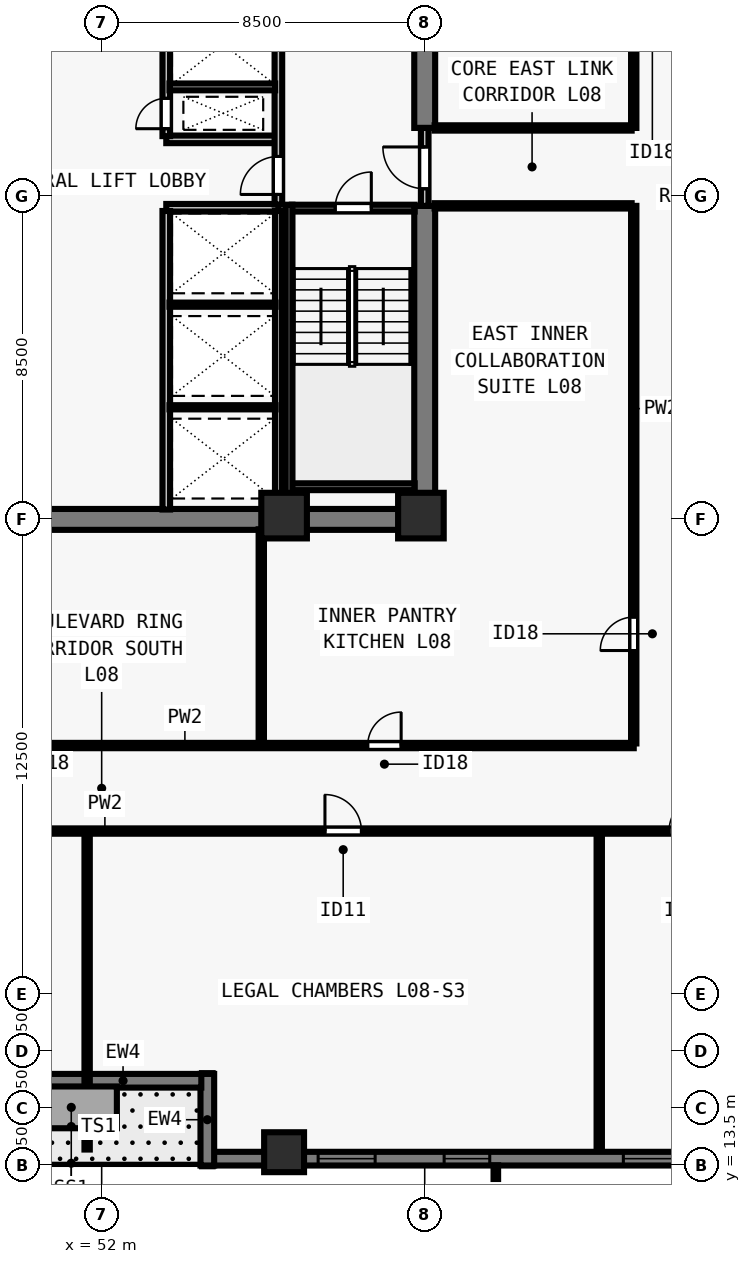
"""IFC4 building model, lengths in metres.
Left out: names, types, materials, properties, quantities, classifications, styles, units other than length and angle.
Written with IfcOpenShell. Run it as: python <this file> out.ifc"""

import sys

from ifc_helpers import new_model, si_unit, direction, frame, frame_2d, origin, origin_2d, place, context, subcontext, project, spatial, rectangle, extrude, element, fill, save


model = new_model("IFC4")
c1 = context("Model", 3, precision=1e-05, world=origin(), true_north=direction((0.0, 1.0)))
c2 = subcontext(c1, "Body", "Model", "MODEL_VIEW")
j1 = project(units=[si_unit("LENGTHUNIT", "METRE"), si_unit("PLANEANGLEUNIT", "RADIAN")], contexts=[c1])
p1 = place(None, origin())
s1 = spatial("IfcSite", under=j1, at=p1, CompositionType="ELEMENT")
p2 = place(p1, origin())
s2 = spatial("IfcBuilding", under=s1, at=p2, CompositionType="ELEMENT")
p3 = place(p2, frame((0.0, 0.0, 34.0)))
s3 = spatial("IfcBuildingStorey", under=s2, at=p3, CompositionType="ELEMENT", Elevation=34.0)
for number, where, z_axis, x_axis in (
    (1, (56.8, 30.6, 0.0), (0.0, 0.0, 1.0), (1.0, 0.0, 0.0)),
    (2, (60.4, 30.6, 0.0), (0.0, 0.0, 1.0), (1.0, 0.0, 0.0)),
):
    element("IfcColumn", number, at=place(p3, frame(where, z_axis=z_axis, x_axis=x_axis)), inside=s3, PredefinedType="COLUMN", context=c2, shape_type="SweptSolid", body=[
        extrude(rectangle(XDim=1.2, YDim=1.2, at=origin_2d()), origin(), (0.0, 0.0, 1.0), 3.5),
    ])
p4 = place(p3, frame((56.8, 13.85, 0.0), z_axis=(0.0, 0.0, 1.0), x_axis=(1.0, 0.0, 0.0)))
e3 = element("IfcColumn", 3, at=p4, inside=s3, PredefinedType="COLUMN", context=c2, shape_type="SweptSolid", body=[
    extrude(rectangle(XDim=1.05, YDim=1.05, at=origin_2d()), origin(), (0.0, 0.0, 1.0), 3.5),
])
p5 = place(p3, frame((74.5, 13.68, 0.0), z_axis=(0.0, 0.0, 1.0), x_axis=(-1.0, 0.0, 0.0)))
e4 = element("IfcWall", 4, at=p5, inside=s3, PredefinedType="SOLIDWALL", context=c2, shape_type="SweptSolid", body=[
    extrude(rectangle(XDim=19.562, YDim=0.36, at=frame_2d((9.781, 0.0))), origin(), (0.0, 0.0, 1.0), 3.28),
])
p6 = place(p5, frame((5.058, 0.0, 0.8)))
e5 = element("IfcOpeningElement", 5, at=p6, cuts=e4, PredefinedType="OPENING", context=c2, shape_type="SweptSolid", body=[
    extrude(rectangle(XDim=1.2, YDim=1.544, at=frame_2d((0.6, 0.772))), frame((0.0, 0.19, 0.0), z_axis=(0.0, -1.0, 0.0), x_axis=(1.0, 0.0, 0.0)), (0.0, 0.0, 1.0), 0.38),
])
p7 = place(p5, frame((7.273, 0.0, 0.8)))
e6 = element("IfcOpeningElement", 6, at=p7, cuts=e4, PredefinedType="OPENING", context=c2, shape_type="SweptSolid", body=[
    extrude(rectangle(XDim=1.5, YDim=1.544, at=frame_2d((0.75, 0.772))), frame((0.0, 0.19, 0.0), z_axis=(0.0, -1.0, 0.0), x_axis=(1.0, 0.0, 0.0)), (0.0, 0.0, 1.0), 0.38),
])
p8 = place(p5, frame((12.289, 0.0, 0.8)))
e7 = element("IfcOpeningElement", 7, at=p8, cuts=e4, PredefinedType="OPENING", context=c2, shape_type="SweptSolid", body=[
    extrude(rectangle(XDim=1.2, YDim=1.544, at=frame_2d((0.6, 0.772))), frame((0.0, 0.19, 0.0), z_axis=(0.0, -1.0, 0.0), x_axis=(1.0, 0.0, 0.0)), (0.0, 0.0, 1.0), 0.38),
])
p9 = place(p5, frame((15.304, 0.0, 0.8)))
e8 = element("IfcOpeningElement", 8, at=p9, cuts=e4, PredefinedType="OPENING", context=c2, shape_type="SweptSolid", body=[
    extrude(rectangle(XDim=1.5, YDim=1.544, at=frame_2d((0.75, 0.772))), frame((0.0, 0.19, 0.0), z_axis=(0.0, -1.0, 0.0), x_axis=(1.0, 0.0, 0.0)), (0.0, 0.0, 1.0), 0.38),
])
p10 = place(p3, frame((54.78, 13.5, 0.0), z_axis=(0.0, 0.0, 1.0), x_axis=(0.0, 1.0, 0.0)))
e9 = element("IfcWall", 9, at=p10, inside=s3, PredefinedType="SOLIDWALL", context=c2, shape_type="SweptSolid", body=[
    extrude(rectangle(XDim=2.41, YDim=0.36, at=frame_2d((1.205, 0.0))), origin(), (0.0, 0.0, 1.0), 3.28),
])
p11 = place(p3, frame((54.622, 15.73, 0.0), z_axis=(0.0, 0.0, 1.0), x_axis=(-1.0, 0.0, 0.0)))
e10 = element("IfcWall", 10, at=p11, inside=s3, PredefinedType="SOLIDWALL", context=c2, shape_type="SweptSolid", body=[
    extrude(rectangle(XDim=7.182, YDim=0.36, at=frame_2d((3.591, 0.0))), origin(), (0.0, 0.0, 1.0), 3.28),
])
p12 = place(p11, frame((4.268, 0.0, 0.0)))
e11 = element("IfcOpeningElement", 11, at=p12, cuts=e10, PredefinedType="OPENING", context=c2, shape_type="SweptSolid", body=[
    extrude(rectangle(XDim=1.0, YDim=2.15, at=frame_2d((0.5, 1.075))), frame((0.0, 0.19, 0.0), z_axis=(0.0, -1.0, 0.0), x_axis=(1.0, 0.0, 0.0)), (0.0, 0.0, 1.0), 0.38),
])
p13 = place(p3, frame((43.225, 30.5, 0.0), z_axis=(0.0, 0.0, 1.0), x_axis=(1.0, 0.0, 0.0)))
e12 = element("IfcWall", 12, at=p13, inside=s3, PredefinedType="SHEAR", context=c2, shape_type="SweptSolid", body=[
    extrude(rectangle(XDim=17.55, YDim=0.55, at=frame_2d((8.775, 0.0))), origin(), (0.0, 0.0, 1.0), 3.28),
])
p14 = place(p3, frame((60.5, 30.765, 0.0), z_axis=(0.0, 0.0, 1.0), x_axis=(0.0, 1.0, 0.0)))
e13 = element("IfcWall", 13, at=p14, inside=s3, PredefinedType="SHEAR", context=c2, shape_type="SweptSolid", body=[
    extrude(rectangle(XDim=7.985, YDim=0.55, at=frame_2d((3.993, 0.0))), origin(), (0.0, 0.0, 1.0), 3.28),
])
p15 = place(p3, frame((60.5, 40.8, 0.0), z_axis=(0.0, 0.0, 1.0), x_axis=(0.0, 1.0, 0.0)))
e14 = element("IfcWall", 14, at=p15, inside=s3, PredefinedType="SHEAR", context=c2, shape_type="SweptSolid", body=[
    extrude(rectangle(XDim=6.435, YDim=0.55, at=frame_2d((3.218, 0.0))), origin(), (0.0, 0.0, 1.0), 3.28),
])
for number, where, z_axis, x_axis in (
    (15, (53.7, 38.7, 0.0), (0.0, 0.0, 1.0), (1.0, 0.0, 0.0)),
    (16, (53.7, 40.5, 0.0), (0.0, 0.0, 1.0), (1.0, 0.0, 0.0)),
):
    element("IfcWall", number, at=place(p3, frame(where, z_axis=z_axis, x_axis=x_axis)), inside=s3, PredefinedType="SOLIDWALL", context=c2, shape_type="SweptSolid", body=[
        extrude(rectangle(XDim=2.95, YDim=0.2, at=frame_2d((1.475, 0.0))), origin(), (0.0, 0.0, 1.0), 3.28),
    ])
p16 = place(p3, frame((53.7, 30.76, 0.0), z_axis=(0.0, 0.0, 1.0), x_axis=(0.0, 1.0, 0.0)))
e17 = element("IfcWall", 17, at=p16, inside=s3, PredefinedType="SOLIDWALL", context=c2, shape_type="SweptSolid", body=[
    extrude(rectangle(XDim=7.855, YDim=0.2, at=frame_2d((3.927, 0.0))), origin(), (0.0, 0.0, 1.0), 3.28),
])
p17 = place(p3, frame((53.7, 40.585, 0.0), z_axis=(0.0, 0.0, 1.0), x_axis=(0.0, 1.0, 0.0)))
e18 = element("IfcWall", 18, at=p17, inside=s3, PredefinedType="SOLIDWALL", context=c2, shape_type="SweptSolid", body=[
    extrude(rectangle(XDim=6.655, YDim=0.2, at=frame_2d((3.328, 0.0))), origin(), (0.0, 0.0, 1.0), 3.28),
])
p18 = place(p17, frame((0.195, 0.0, 0.0)))
e19 = element("IfcOpeningElement", 19, at=p18, cuts=e18, PredefinedType="OPENING", context=c2, shape_type="SweptSolid", body=[
    extrude(rectangle(XDim=0.8, YDim=2.08, at=frame_2d((0.4, 1.04))), frame((0.0, 0.11, 0.0), z_axis=(0.0, -1.0, 0.0), x_axis=(1.0, 0.0, 0.0)), (0.0, 0.0, 1.0), 0.22),
])
p19 = place(p17, frame((3.735, 0.0, 0.0)))
e20 = element("IfcOpeningElement", 20, at=p19, cuts=e18, PredefinedType="OPENING", context=c2, shape_type="SweptSolid", body=[
    extrude(rectangle(XDim=0.9, YDim=2.12, at=frame_2d((0.45, 1.06))), frame((0.0, 0.11, 0.0), z_axis=(0.0, -1.0, 0.0), x_axis=(1.0, 0.0, 0.0)), (0.0, 0.0, 1.0), 0.22),
])
p20 = place(p17, frame((5.395, 0.0, 0.0)))
e21 = element("IfcOpeningElement", 21, at=p20, cuts=e18, PredefinedType="OPENING", context=c2, shape_type="SweptSolid", body=[
    extrude(rectangle(XDim=0.8, YDim=2.1, at=frame_2d((0.4, 1.05))), frame((0.0, 0.11, 0.0), z_axis=(0.0, -1.0, 0.0), x_axis=(1.0, 0.0, 0.0)), (0.0, 0.0, 1.0), 0.22),
])
p21 = place(p3, frame((60.5, 38.75, 0.0), z_axis=(0.0, 0.0, 1.0), x_axis=(0.0, 1.0, 0.0)))
e22 = element("IfcWall", 22, at=p21, inside=s3, PredefinedType="SOLIDWALL", context=c2, shape_type="SweptSolid", body=[
    extrude(rectangle(XDim=2.05, YDim=0.2, at=frame_2d((1.025, 0.0))), origin(), (0.0, 0.0, 1.0), 3.28),
])
p22 = place(p21, frame((0.45, 0.0, 0.0)))
e23 = element("IfcOpeningElement", 23, at=p22, cuts=e22, PredefinedType="OPENING", context=c2, shape_type="SweptSolid", body=[
    extrude(rectangle(XDim=1.1, YDim=2.15, at=frame_2d((0.55, 1.075))), frame((0.0, 0.11, 0.0), z_axis=(0.0, -1.0, 0.0), x_axis=(1.0, 0.0, 0.0)), (0.0, 0.0, 1.0), 0.22),
])
p23 = place(p3, frame((56.65, 38.785, 0.0), z_axis=(0.0, 0.0, 1.0), x_axis=(0.0, 1.0, 0.0)))
e24 = element("IfcWall", 24, at=p23, inside=s3, PredefinedType="SOLIDWALL", context=c2, shape_type="SweptSolid", body=[
    extrude(rectangle(XDim=4.865, YDim=0.2, at=frame_2d((2.433, 0.0))), origin(), (0.0, 0.0, 1.0), 3.28),
])
p24 = place(p23, frame((0.265, 0.0, 0.0)))
e25 = element("IfcOpeningElement", 25, at=p24, cuts=e24, PredefinedType="OPENING", context=c2, shape_type="SweptSolid", body=[
    extrude(rectangle(XDim=1.0, YDim=2.15, at=frame_2d((0.5, 1.075))), frame((0.0, 0.11, 0.0), z_axis=(0.0, -1.0, 0.0), x_axis=(1.0, 0.0, 0.0)), (0.0, 0.0, 1.0), 0.22),
])
p25 = place(p3, frame((56.65, 30.76, 0.0), z_axis=(0.0, 0.0, 1.0), x_axis=(0.0, 1.0, 0.0)))
e26 = element("IfcWall", 26, at=p25, inside=s3, PredefinedType="SOLIDWALL", context=c2, shape_type="SweptSolid", body=[
    extrude(rectangle(XDim=7.855, YDim=0.18, at=frame_2d((3.927, 0.0))), origin(), (0.0, 0.0, 1.0), 3.28),
])
for number, where, z_axis, x_axis in (
    (27, (53.785, 33.45, 0.0), (0.0, 0.0, 1.0), (1.0, 0.0, 0.0)),
    (28, (53.785, 36.15, 0.0), (0.0, 0.0, 1.0), (1.0, 0.0, 0.0)),
):
    element("IfcWall", number, at=place(p3, frame(where, z_axis=z_axis, x_axis=x_axis)), inside=s3, PredefinedType="PARTITIONING", context=c2, shape_type="SweptSolid", body=[
        extrude(rectangle(XDim=2.79, YDim=0.11, at=frame_2d((1.395, 0.0))), origin(), (0.0, 0.0, 1.0), 3.28),
    ])
p26 = place(p3, frame((53.785, 41.88, 0.0), z_axis=(0.0, 0.0, 1.0), x_axis=(1.0, 0.0, 0.0)))
e29 = element("IfcWall", 29, at=p26, inside=s3, PredefinedType="SOLIDWALL", context=c2, shape_type="SweptSolid", body=[
    extrude(rectangle(XDim=2.78, YDim=0.18, at=frame_2d((1.39, 0.0))), origin(), (0.0, 0.0, 1.0), 3.28),
])
p27 = place(p3, frame((35.75, 22.3, 0.0), z_axis=(0.0, 0.0, 1.0), x_axis=(1.0, 0.0, 0.0)))
e30 = element("IfcWall", 30, at=p27, inside=s3, PredefinedType="PARTITIONING", context=c2, shape_type="SweptSolid", body=[
    extrude(rectangle(XDim=32.5, YDim=0.14, at=frame_2d((16.25, 0.0))), origin(), (0.0, 0.0, 1.0), 3.28),
])
p28 = place(p27, frame((1.604, 0.0, 0.0)))
e31 = element("IfcOpeningElement", 31, at=p28, cuts=e30, PredefinedType="OPENING", context=c2, shape_type="SweptSolid", body=[
    extrude(rectangle(XDim=0.96, YDim=2.12, at=frame_2d((0.48, 1.06))), frame((0.0, 0.08, 0.0), z_axis=(0.0, -1.0, 0.0), x_axis=(1.0, 0.0, 0.0)), (0.0, 0.0, 1.0), 0.16),
])
p29 = place(p27, frame((9.585, 0.0, 0.0)))
e32 = element("IfcOpeningElement", 32, at=p29, cuts=e30, PredefinedType="OPENING", context=c2, shape_type="SweptSolid", body=[
    extrude(rectangle(XDim=0.96, YDim=2.12, at=frame_2d((0.48, 1.06))), frame((0.0, 0.08, 0.0), z_axis=(0.0, -1.0, 0.0), x_axis=(1.0, 0.0, 0.0)), (0.0, 0.0, 1.0), 0.16),
])
p30 = place(p27, frame((22.125, 0.0, 0.0)))
e33 = element("IfcOpeningElement", 33, at=p30, cuts=e30, PredefinedType="OPENING", context=c2, shape_type="SweptSolid", body=[
    extrude(rectangle(XDim=0.96, YDim=2.12, at=frame_2d((0.48, 1.06))), frame((0.0, 0.08, 0.0), z_axis=(0.0, -1.0, 0.0), x_axis=(1.0, 0.0, 0.0)), (0.0, 0.0, 1.0), 0.16),
])
p31 = place(p27, frame((31.18, 0.0, 0.0)))
e34 = element("IfcOpeningElement", 34, at=p31, cuts=e30, PredefinedType="OPENING", context=c2, shape_type="SweptSolid", body=[
    extrude(rectangle(XDim=0.96, YDim=2.12, at=frame_2d((0.48, 1.06))), frame((0.0, 0.08, 0.0), z_axis=(0.0, -1.0, 0.0), x_axis=(1.0, 0.0, 0.0)), (0.0, 0.0, 1.0), 0.16),
])
p32 = place(p3, frame((38.0, 24.55, 0.0), z_axis=(0.0, 0.0, 1.0), x_axis=(1.0, 0.0, 0.0)))
e35 = element("IfcWall", 35, at=p32, inside=s3, PredefinedType="PARTITIONING", context=c2, shape_type="SweptSolid", body=[
    extrude(rectangle(XDim=28.0, YDim=0.14, at=frame_2d((14.0, 0.0))), origin(), (0.0, 0.0, 1.0), 3.28),
])
p33 = place(p32, frame((1.2, 0.0, 0.0)))
e36 = element("IfcOpeningElement", 36, at=p33, cuts=e35, PredefinedType="OPENING", context=c2, shape_type="SweptSolid", body=[
    extrude(rectangle(XDim=0.88, YDim=2.1, at=frame_2d((0.44, 1.05))), frame((0.0, 0.08, 0.0), z_axis=(0.0, -1.0, 0.0), x_axis=(1.0, 0.0, 0.0)), (0.0, 0.0, 1.0), 0.16),
])
p34 = place(p32, frame((10.5, 0.0, 0.0)))
e37 = element("IfcOpeningElement", 37, at=p34, cuts=e35, PredefinedType="OPENING", context=c2, shape_type="SweptSolid", body=[
    extrude(rectangle(XDim=0.88, YDim=2.1, at=frame_2d((0.44, 1.05))), frame((0.0, 0.08, 0.0), z_axis=(0.0, -1.0, 0.0), x_axis=(1.0, 0.0, 0.0)), (0.0, 0.0, 1.0), 0.16),
])
p35 = place(p32, frame((21.0, 0.0, 0.0)))
e38 = element("IfcOpeningElement", 38, at=p35, cuts=e35, PredefinedType="OPENING", context=c2, shape_type="SweptSolid", body=[
    extrude(rectangle(XDim=0.88, YDim=2.1, at=frame_2d((0.44, 1.05))), frame((0.0, 0.08, 0.0), z_axis=(0.0, -1.0, 0.0), x_axis=(1.0, 0.0, 0.0)), (0.0, 0.0, 1.0), 0.16),
])
p36 = place(p3, frame((66.0, 24.605, 0.0), z_axis=(0.0, 0.0, 1.0), x_axis=(0.0, 1.0, 0.0)))
e39 = element("IfcWall", 39, at=p36, inside=s3, PredefinedType="PARTITIONING", context=c2, shape_type="SweptSolid", body=[
    extrude(rectangle(XDim=14.145, YDim=0.14, at=frame_2d((7.073, 0.0))), origin(), (0.0, 0.0, 1.0), 3.28),
])
p37 = place(p36, frame((2.445, 0.0, 0.0)))
e40 = element("IfcOpeningElement", 40, at=p37, cuts=e39, PredefinedType="OPENING", context=c2, shape_type="SweptSolid", body=[
    extrude(rectangle(XDim=0.88, YDim=2.1, at=frame_2d((0.44, 1.05))), frame((0.0, 0.08, 0.0), z_axis=(0.0, -1.0, 0.0), x_axis=(1.0, 0.0, 0.0)), (0.0, 0.0, 1.0), 0.16),
])
p38 = place(p3, frame((66.0, 40.8, 0.0), z_axis=(0.0, 0.0, 1.0), x_axis=(0.0, 1.0, 0.0)))
e41 = element("IfcWall", 41, at=p38, inside=s3, PredefinedType="PARTITIONING", context=c2, shape_type="SweptSolid", body=[
    extrude(rectangle(XDim=12.595, YDim=0.14, at=frame_2d((6.297, 0.0))), origin(), (0.0, 0.0, 1.0), 3.28),
])
p39 = place(p38, frame((2.5, 0.0, 0.0)))
e42 = element("IfcOpeningElement", 42, at=p39, cuts=e41, PredefinedType="OPENING", context=c2, shape_type="SweptSolid", body=[
    extrude(rectangle(XDim=0.88, YDim=2.1, at=frame_2d((0.44, 1.05))), frame((0.0, 0.08, 0.0), z_axis=(0.0, -1.0, 0.0), x_axis=(1.0, 0.0, 0.0)), (0.0, 0.0, 1.0), 0.16),
])
for number, where, z_axis, x_axis in (
    (43, (60.76, 38.75, 0.0), (0.0, 0.0, 1.0), (1.0, 0.0, 0.0)),
    (44, (60.76, 40.8, 0.0), (0.0, 0.0, 1.0), (1.0, 0.0, 0.0)),
):
    element("IfcWall", number, at=place(p3, frame(where, z_axis=z_axis, x_axis=x_axis)), inside=s3, PredefinedType="PARTITIONING", context=c2, shape_type="SweptSolid", body=[
        extrude(rectangle(XDim=5.185, YDim=0.14, at=frame_2d((2.593, 0.0))), origin(), (0.0, 0.0, 1.0), 3.28),
    ])
p40 = place(p3, frame((56.2, 24.605, 0.0), z_axis=(0.0, 0.0, 1.0), x_axis=(0.0, 1.0, 0.0)))
e45 = element("IfcWall", 45, at=p40, inside=s3, PredefinedType="PARTITIONING", context=c2, shape_type="SweptSolid", body=[
    extrude(rectangle(XDim=5.635, YDim=0.14, at=frame_2d((2.817, 0.0))), origin(), (0.0, 0.0, 1.0), 2.849),
])
p41 = place(p3, frame((51.617, 13.92, 0.0), z_axis=(0.0, 0.0, 1.0), x_axis=(0.0, 1.0, 0.0)))
e46 = element("IfcWall", 46, at=p41, inside=s3, PredefinedType="PARTITIONING", context=c2, shape_type="SweptSolid", body=[
    extrude(rectangle(XDim=8.28, YDim=0.14, at=frame_2d((4.14, 0.0))), origin(), (0.0, 0.0, 1.0), 2.849),
])
p42 = place(p3, frame((65.093, 13.92, 0.0), z_axis=(0.0, 0.0, 1.0), x_axis=(0.0, 1.0, 0.0)))
e47 = element("IfcWall", 47, at=p42, inside=s3, PredefinedType="PARTITIONING", context=c2, shape_type="SweptSolid", body=[
    extrude(rectangle(XDim=8.28, YDim=0.14, at=frame_2d((4.14, 0.0))), origin(), (0.0, 0.0, 1.0), 3.28),
])
p43 = place(p3, frame((57.005, 38.69, 0.0), z_axis=(0.0, 0.0, 1.0), x_axis=(1.0, 0.0, 0.0)))
e48 = element("IfcWall", 48, at=p43, inside=s3, PredefinedType="SOLIDWALL", context=c2, shape_type="SweptSolid", body=[
    extrude(rectangle(XDim=3.23, YDim=0.18, at=frame_2d((1.615, 0.0))), origin(), (0.0, 0.0, 1.0), 3.28),
])
p44 = place(p43, frame((1.14, 0.0, 0.0)))
e49 = element("IfcOpeningElement", 49, at=p44, cuts=e48, PredefinedType="OPENING", context=c2, shape_type="SweptSolid", body=[
    extrude(rectangle(XDim=0.95, YDim=2.15, at=frame_2d((0.475, 1.075))), frame((0.0, 0.1, 0.0), z_axis=(0.0, -1.0, 0.0), x_axis=(1.0, 0.0, 0.0)), (0.0, 0.0, 1.0), 0.2),
])
p45 = place(p3, frame((57.005, 31.36, 0.0), z_axis=(0.0, 0.0, 1.0), x_axis=(1.0, 0.0, 0.0)))
e50 = element("IfcWall", 50, at=p45, inside=s3, PredefinedType="SOLIDWALL", context=c2, shape_type="SweptSolid", body=[
    extrude(rectangle(XDim=3.23, YDim=0.18, at=frame_2d((1.615, 0.0))), origin(), (0.0, 0.0, 1.0), 3.28),
])
p46 = place(p3, frame((56.93, 38.78, 0.0), z_axis=(0.0, 0.0, 1.0), x_axis=(0.0, -1.0, 0.0)))
e51 = element("IfcWall", 51, at=p46, inside=s3, PredefinedType="SOLIDWALL", context=c2, shape_type="SweptSolid", body=[
    extrude(rectangle(XDim=8.017, YDim=0.18, at=frame_2d((4.009, 0.0))), origin(), (0.0, 0.0, 1.0), 3.28),
])
p47 = place(p7, origin())
e52 = element("IfcWindow", 52, at=p47, inside=s3, PartitioningType="SINGLE_PANEL", PredefinedType="WINDOW", context=c2, shape_type="SweptSolid", body=[
    extrude(rectangle(XDim=1.5, YDim=1.544, at=frame_2d((0.75, 0.772))), frame((0.0, -0.05, 0.0), z_axis=(0.0, -1.0, 0.0), x_axis=(1.0, 0.0, 0.0)), (0.0, 0.0, 1.0), 0.06),
])
fill(e6, e52)
p48 = place(p8, origin())
e53 = element("IfcWindow", 53, at=p48, inside=s3, PartitioningType="SINGLE_PANEL", PredefinedType="WINDOW", context=c2, shape_type="SweptSolid", body=[
    extrude(rectangle(XDim=1.2, YDim=1.544, at=frame_2d((0.6, 0.772))), frame((0.0, -0.05, 0.0), z_axis=(0.0, -1.0, 0.0), x_axis=(1.0, 0.0, 0.0)), (0.0, 0.0, 1.0), 0.06),
])
fill(e7, e53)
p49 = place(p9, origin())
e54 = element("IfcWindow", 54, at=p49, inside=s3, PartitioningType="SINGLE_PANEL", PredefinedType="WINDOW", context=c2, shape_type="SweptSolid", body=[
    extrude(rectangle(XDim=1.5, YDim=1.544, at=frame_2d((0.75, 0.772))), frame((0.0, -0.05, 0.0), z_axis=(0.0, -1.0, 0.0), x_axis=(1.0, 0.0, 0.0)), (0.0, 0.0, 1.0), 0.06),
])
fill(e8, e54)
p50 = place(p22, origin())
e55 = element("IfcDoor", 55, at=p50, inside=s3, OperationType="SINGLE_SWING_RIGHT", PredefinedType="DOOR", context=c2, shape_type="SweptSolid", body=[
    extrude(rectangle(XDim=1.1, YDim=2.15, at=frame_2d((0.55, 1.075))), frame((0.0, 0.025, 0.0), z_axis=(0.0, -1.0, 0.0), x_axis=(1.0, 0.0, 0.0)), (0.0, 0.0, 1.0), 0.05),
])
fill(e23, e55)
p51 = place(p24, origin())
e56 = element("IfcDoor", 56, at=p51, inside=s3, OperationType="SINGLE_SWING_LEFT", PredefinedType="DOOR", context=c2, shape_type="SweptSolid", body=[
    extrude(rectangle(XDim=1.0, YDim=2.15, at=frame_2d((0.5, 1.075))), frame((0.0, 0.025, 0.0), z_axis=(0.0, -1.0, 0.0), x_axis=(1.0, 0.0, 0.0)), (0.0, 0.0, 1.0), 0.05),
])
fill(e25, e56)
p52 = place(p18, origin())
e57 = element("IfcDoor", 57, at=p52, inside=s3, OperationType="SINGLE_SWING_LEFT", PredefinedType="DOOR", context=c2, shape_type="SweptSolid", body=[
    extrude(rectangle(XDim=0.8, YDim=2.08, at=frame_2d((0.4, 1.04))), frame((0.0, 0.025, 0.0), z_axis=(0.0, -1.0, 0.0), x_axis=(1.0, 0.0, 0.0)), (0.0, 0.0, 1.0), 0.05),
])
fill(e19, e57)
p53 = place(p35, origin())
e58 = element("IfcDoor", 58, at=p53, inside=s3, OperationType="SINGLE_SWING_RIGHT", PredefinedType="DOOR", context=c2, shape_type="SweptSolid", body=[
    extrude(rectangle(XDim=0.88, YDim=2.1, at=frame_2d((0.44, 1.05))), frame((0.0, 0.025, 0.0), z_axis=(0.0, -1.0, 0.0), x_axis=(1.0, 0.0, 0.0)), (0.0, 0.0, 1.0), 0.05),
])
fill(e38, e58)
p54 = place(p37, origin())
e59 = element("IfcDoor", 59, at=p54, inside=s3, OperationType="SINGLE_SWING_LEFT", PredefinedType="DOOR", context=c2, shape_type="SweptSolid", body=[
    extrude(rectangle(XDim=0.88, YDim=2.1, at=frame_2d((0.44, 1.05))), frame((0.0, 0.025, 0.0), z_axis=(0.0, -1.0, 0.0), x_axis=(1.0, 0.0, 0.0)), (0.0, 0.0, 1.0), 0.05),
])
fill(e40, e59)
p55 = place(p30, origin())
e60 = element("IfcDoor", 60, at=p55, inside=s3, OperationType="SINGLE_SWING_LEFT", PredefinedType="DOOR", context=c2, shape_type="SweptSolid", body=[
    extrude(rectangle(XDim=0.96, YDim=2.12, at=frame_2d((0.48, 1.06))), frame((0.0, 0.025, 0.0), z_axis=(0.0, -1.0, 0.0), x_axis=(1.0, 0.0, 0.0)), (0.0, 0.0, 1.0), 0.05),
])
fill(e33, e60)
p56 = place(p31, origin())
e61 = element("IfcDoor", 61, at=p56, inside=s3, OperationType="SINGLE_SWING_RIGHT", PredefinedType="DOOR", context=c2, shape_type="SweptSolid", body=[
    extrude(rectangle(XDim=0.96, YDim=2.12, at=frame_2d((0.48, 1.06))), frame((0.0, 0.025, 0.0), z_axis=(0.0, -1.0, 0.0), x_axis=(1.0, 0.0, 0.0)), (0.0, 0.0, 1.0), 0.05),
])
fill(e34, e61)
p57 = place(p44, origin())
e62 = element("IfcDoor", 62, at=p57, inside=s3, OperationType="SINGLE_SWING_RIGHT", PredefinedType="DOOR", context=c2, shape_type="SweptSolid", body=[
    extrude(rectangle(XDim=0.95, YDim=2.15, at=frame_2d((0.475, 1.075))), frame((0.0, 0.025, 0.0), z_axis=(0.0, -1.0, 0.0), x_axis=(1.0, 0.0, 0.0)), (0.0, 0.0, 1.0), 0.05),
])
fill(e49, e62)
save(model, sys.argv[1])
